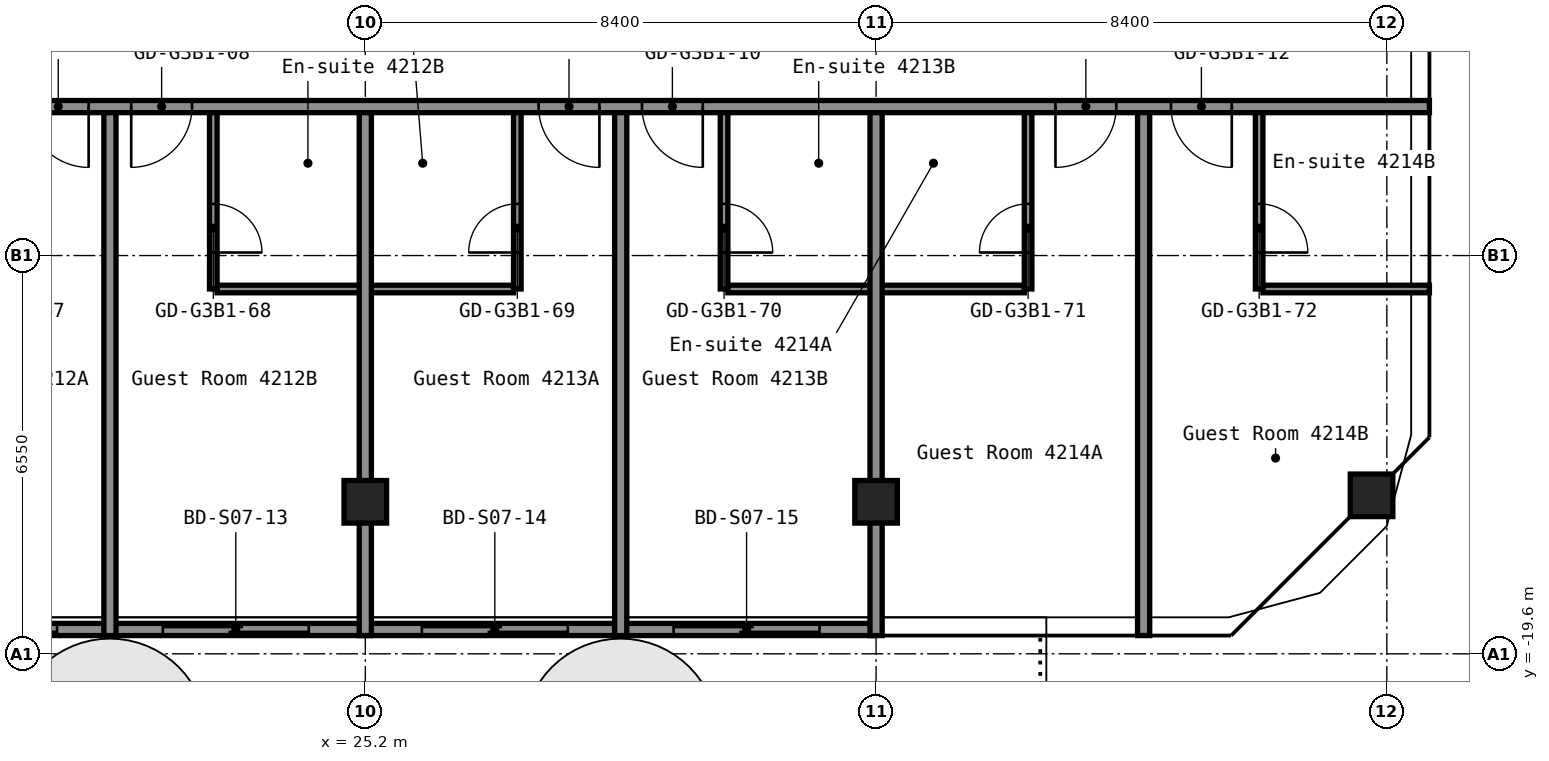
"""IFC4 building model, lengths in metres.
Left out: names, types, materials, properties, quantities, classifications, styles, units other than length and angle.
Written with IfcOpenShell. Run it as: python <this file> out.ifc"""

import sys

from ifc_helpers import new_model, si_unit, direction, frame, frame_2d, origin, origin_2d, place, context, subcontext, project, spatial, rectangle, hollow_rectangle, extrude, element, fill, save


model = new_model("IFC4")
c1 = context("Model", 3, precision=1e-05, world=origin(), true_north=direction((0.0, 1.0)))
c2 = subcontext(c1, "Body", "Model", "MODEL_VIEW")
j1 = project(units=[si_unit("LENGTHUNIT", "METRE"), si_unit("PLANEANGLEUNIT", "RADIAN")], contexts=[c1])
p1 = place(None, origin())
s1 = spatial("IfcSite", under=j1, at=p1, CompositionType="ELEMENT")
p2 = place(p1, origin())
s2 = spatial("IfcBuilding", under=s1, at=p2, CompositionType="ELEMENT")
p3 = place(p2, frame((0.0, 0.0, 150.2)))
s3 = spatial("IfcBuildingStorey", under=s2, at=p3, CompositionType="ELEMENT", Elevation=150.2)
for number, where, z_axis, x_axis in (
    (1, (25.2, -17.1, 0.0), (0.0, 0.0, 1.0), (1.0, 0.0, 0.0)),
    (2, (33.6, -17.1, 0.0), (0.0, 0.0, 1.0), (1.0, 0.0, 0.0)),
    (3, (41.749, -16.994, 0.0), (0.0, 0.0, 1.0), (1.0, 0.0, 0.0)),
):
    element("IfcColumn", number, at=place(p3, frame(where, z_axis=z_axis, x_axis=x_axis)), inside=s3, PredefinedType="COLUMN", context=c2, shape_type="SweptSolid", body=[
        extrude(hollow_rectangle(XDim=0.7, YDim=0.7, WallThickness=0.028, at=origin_2d()), origin(), (0.0, 0.0, 1.0), 2.75),
    ])
for number, where, z_axis, x_axis in (
    (4, (22.762, -13.6, 0.0), (0.0, 0.0, 1.0), (1.0, 0.0, 0.0)),
    (5, (31.163, -13.6, 0.0), (0.0, 0.0, 1.0), (1.0, 0.0, 0.0)),
):
    element("IfcWall", number, at=place(p3, frame(where, z_axis=z_axis, x_axis=x_axis)), inside=s3, PredefinedType="PARTITIONING", context=c2, shape_type="SweptSolid", body=[
        extrude(rectangle(XDim=4.875, YDim=0.125, at=frame_2d((2.438, 0.0))), origin(), (0.0, 0.0, 1.0), 2.75),
    ])
p4 = place(p3, frame((39.962, -13.6, 0.0), z_axis=(0.0, 0.0, 1.0), x_axis=(1.0, 0.0, 0.0)))
e6 = element("IfcWall", 6, at=p4, inside=s3, PredefinedType="PARTITIONING", context=c2, shape_type="SweptSolid", body=[
    extrude(rectangle(XDim=2.738, YDim=0.125, at=frame_2d((1.369, 0.0))), origin(), (0.0, 0.0, 1.0), 2.75),
])
p5 = place(p3, frame((16.8, -10.6, 0.0), z_axis=(0.0, 0.0, 1.0), x_axis=(1.0, 0.0, 0.0)))
e7 = element("IfcWall", 7, at=p5, inside=s3, PredefinedType="PARTITIONING", context=c2, shape_type="SweptSolid", body=[
    extrude(rectangle(XDim=25.9, YDim=0.2, at=frame_2d((12.95, 0.0))), origin(), (0.0, 0.0, 1.0), 2.75),
])
p6 = place(p5, frame((2.85, 0.0, 0.0)))
e8 = element("IfcOpeningElement", 8, at=p6, cuts=e7, PredefinedType="OPENING", context=c2, shape_type="SweptSolid", body=[
    extrude(rectangle(XDim=1.0, YDim=2.1, at=frame_2d((0.5, 1.05))), frame((0.0, 0.11, 0.0), z_axis=(0.0, -1.0, 0.0), x_axis=(1.0, 0.0, 0.0)), (0.0, 0.0, 1.0), 0.22),
])
p7 = place(p5, frame((4.55, 0.0, 0.0)))
e9 = element("IfcOpeningElement", 9, at=p7, cuts=e7, PredefinedType="OPENING", context=c2, shape_type="SweptSolid", body=[
    extrude(rectangle(XDim=1.0, YDim=2.1, at=frame_2d((0.5, 1.05))), frame((0.0, 0.11, 0.0), z_axis=(0.0, -1.0, 0.0), x_axis=(1.0, 0.0, 0.0)), (0.0, 0.0, 1.0), 0.22),
])
p8 = place(p5, frame((11.25, 0.0, 0.0)))
e10 = element("IfcOpeningElement", 10, at=p8, cuts=e7, PredefinedType="OPENING", context=c2, shape_type="SweptSolid", body=[
    extrude(rectangle(XDim=1.0, YDim=2.1, at=frame_2d((0.5, 1.05))), frame((0.0, 0.11, 0.0), z_axis=(0.0, -1.0, 0.0), x_axis=(1.0, 0.0, 0.0)), (0.0, 0.0, 1.0), 0.22),
])
p9 = place(p5, frame((12.95, 0.0, 0.0)))
e11 = element("IfcOpeningElement", 11, at=p9, cuts=e7, PredefinedType="OPENING", context=c2, shape_type="SweptSolid", body=[
    extrude(rectangle(XDim=1.0, YDim=2.1, at=frame_2d((0.5, 1.05))), frame((0.0, 0.11, 0.0), z_axis=(0.0, -1.0, 0.0), x_axis=(1.0, 0.0, 0.0)), (0.0, 0.0, 1.0), 0.22),
])
p10 = place(p5, frame((19.75, 0.0, 0.0)))
e12 = element("IfcOpeningElement", 12, at=p10, cuts=e7, PredefinedType="OPENING", context=c2, shape_type="SweptSolid", body=[
    extrude(rectangle(XDim=1.0, YDim=2.1, at=frame_2d((0.5, 1.05))), frame((0.0, 0.11, 0.0), z_axis=(0.0, -1.0, 0.0), x_axis=(1.0, 0.0, 0.0)), (0.0, 0.0, 1.0), 0.22),
])
p11 = place(p5, frame((21.65, 0.0, 0.0)))
e13 = element("IfcOpeningElement", 13, at=p11, cuts=e7, PredefinedType="OPENING", context=c2, shape_type="SweptSolid", body=[
    extrude(rectangle(XDim=1.0, YDim=2.1, at=frame_2d((0.5, 1.05))), frame((0.0, 0.11, 0.0), z_axis=(0.0, -1.0, 0.0), x_axis=(1.0, 0.0, 0.0)), (0.0, 0.0, 1.0), 0.22),
])
p12 = place(p3, frame((21.0, -19.3, 0.0), z_axis=(0.0, 0.0, 1.0), x_axis=(0.0, 1.0, 0.0)))
e14 = element("IfcWall", 14, at=p12, inside=s3, PredefinedType="PARTITIONING", context=c2, shape_type="SweptSolid", body=[
    extrude(rectangle(XDim=8.6, YDim=0.2, at=frame_2d((4.3, 0.0))), origin(), (0.0, 0.0, 1.0), 2.75),
])
p13 = place(p3, frame((22.7, -13.6, 0.0), z_axis=(0.0, 0.0, 1.0), x_axis=(0.0, 1.0, 0.0)))
e15 = element("IfcWall", 15, at=p13, inside=s3, PredefinedType="PARTITIONING", context=c2, shape_type="SweptSolid", body=[
    extrude(rectangle(XDim=2.9, YDim=0.125, at=frame_2d((1.45, 0.0))), origin(), (0.0, 0.0, 1.0), 2.75),
])
p14 = place(p13, frame((0.6, 0.0, 0.0)))
e16 = element("IfcOpeningElement", 16, at=p14, cuts=e15, PredefinedType="OPENING", context=c2, shape_type="SweptSolid", body=[
    extrude(rectangle(XDim=0.8, YDim=2.1, at=frame_2d((0.4, 1.05))), frame((0.0, 0.073, 0.0), z_axis=(0.0, -1.0, 0.0), x_axis=(1.0, 0.0, 0.0)), (0.0, 0.0, 1.0), 0.145),
])
p15 = place(p3, frame((25.2, -19.3, 0.0), z_axis=(0.0, 0.0, 1.0), x_axis=(0.0, 1.0, 0.0)))
e17 = element("IfcWall", 17, at=p15, inside=s3, PredefinedType="PARTITIONING", context=c2, shape_type="SweptSolid", body=[
    extrude(rectangle(XDim=8.6, YDim=0.2, at=frame_2d((4.3, 0.0))), origin(), (0.0, 0.0, 1.0), 2.75),
])
p16 = place(p3, frame((27.7, -13.6, 0.0), z_axis=(0.0, 0.0, 1.0), x_axis=(0.0, 1.0, 0.0)))
e18 = element("IfcWall", 18, at=p16, inside=s3, PredefinedType="PARTITIONING", context=c2, shape_type="SweptSolid", body=[
    extrude(rectangle(XDim=2.9, YDim=0.125, at=frame_2d((1.45, 0.0))), origin(), (0.0, 0.0, 1.0), 2.75),
])
p17 = place(p16, frame((0.6, 0.0, 0.0)))
e19 = element("IfcOpeningElement", 19, at=p17, cuts=e18, PredefinedType="OPENING", context=c2, shape_type="SweptSolid", body=[
    extrude(rectangle(XDim=0.8, YDim=2.1, at=frame_2d((0.4, 1.05))), frame((0.0, 0.073, 0.0), z_axis=(0.0, -1.0, 0.0), x_axis=(1.0, 0.0, 0.0)), (0.0, 0.0, 1.0), 0.145),
])
p18 = place(p3, frame((29.4, -19.3, 0.0), z_axis=(0.0, 0.0, 1.0), x_axis=(0.0, 1.0, 0.0)))
e20 = element("IfcWall", 20, at=p18, inside=s3, PredefinedType="PARTITIONING", context=c2, shape_type="SweptSolid", body=[
    extrude(rectangle(XDim=8.6, YDim=0.2, at=frame_2d((4.3, 0.0))), origin(), (0.0, 0.0, 1.0), 2.75),
])
p19 = place(p3, frame((31.1, -13.6, 0.0), z_axis=(0.0, 0.0, 1.0), x_axis=(0.0, 1.0, 0.0)))
e21 = element("IfcWall", 21, at=p19, inside=s3, PredefinedType="PARTITIONING", context=c2, shape_type="SweptSolid", body=[
    extrude(rectangle(XDim=2.9, YDim=0.125, at=frame_2d((1.45, 0.0))), origin(), (0.0, 0.0, 1.0), 2.75),
])
p20 = place(p19, frame((0.6, 0.0, 0.0)))
e22 = element("IfcOpeningElement", 22, at=p20, cuts=e21, PredefinedType="OPENING", context=c2, shape_type="SweptSolid", body=[
    extrude(rectangle(XDim=0.8, YDim=2.1, at=frame_2d((0.4, 1.05))), frame((0.0, 0.073, 0.0), z_axis=(0.0, -1.0, 0.0), x_axis=(1.0, 0.0, 0.0)), (0.0, 0.0, 1.0), 0.145),
])
p21 = place(p3, frame((33.6, -19.3, 0.0), z_axis=(0.0, 0.0, 1.0), x_axis=(0.0, 1.0, 0.0)))
e23 = element("IfcWall", 23, at=p21, inside=s3, PredefinedType="PARTITIONING", context=c2, shape_type="SweptSolid", body=[
    extrude(rectangle(XDim=8.6, YDim=0.2, at=frame_2d((4.3, 0.0))), origin(), (0.0, 0.0, 1.0), 2.75),
])
p22 = place(p3, frame((36.1, -13.6, 0.0), z_axis=(0.0, 0.0, 1.0), x_axis=(0.0, 1.0, 0.0)))
e24 = element("IfcWall", 24, at=p22, inside=s3, PredefinedType="PARTITIONING", context=c2, shape_type="SweptSolid", body=[
    extrude(rectangle(XDim=2.9, YDim=0.125, at=frame_2d((1.45, 0.0))), origin(), (0.0, 0.0, 1.0), 2.75),
])
p23 = place(p22, frame((0.6, 0.0, 0.0)))
e25 = element("IfcOpeningElement", 25, at=p23, cuts=e24, PredefinedType="OPENING", context=c2, shape_type="SweptSolid", body=[
    extrude(rectangle(XDim=0.8, YDim=2.1, at=frame_2d((0.4, 1.05))), frame((0.0, 0.073, 0.0), z_axis=(0.0, -1.0, 0.0), x_axis=(1.0, 0.0, 0.0)), (0.0, 0.0, 1.0), 0.145),
])
p24 = place(p3, frame((38.0, -19.3, 0.0), z_axis=(0.0, 0.0, 1.0), x_axis=(0.0, 1.0, 0.0)))
e26 = element("IfcWall", 26, at=p24, inside=s3, PredefinedType="PARTITIONING", context=c2, shape_type="SweptSolid", body=[
    extrude(rectangle(XDim=8.6, YDim=0.2, at=frame_2d((4.3, 0.0))), origin(), (0.0, 0.0, 1.0), 2.75),
])
p25 = place(p3, frame((39.9, -13.6, 0.0), z_axis=(0.0, 0.0, 1.0), x_axis=(0.0, 1.0, 0.0)))
e27 = element("IfcWall", 27, at=p25, inside=s3, PredefinedType="PARTITIONING", context=c2, shape_type="SweptSolid", body=[
    extrude(rectangle(XDim=2.9, YDim=0.125, at=frame_2d((1.45, 0.0))), origin(), (0.0, 0.0, 1.0), 2.75),
])
p26 = place(p25, frame((0.6, 0.0, 0.0)))
e28 = element("IfcOpeningElement", 28, at=p26, cuts=e27, PredefinedType="OPENING", context=c2, shape_type="SweptSolid", body=[
    extrude(rectangle(XDim=0.8, YDim=2.1, at=frame_2d((0.4, 1.05))), frame((0.0, 0.073, 0.0), z_axis=(0.0, -1.0, 0.0), x_axis=(1.0, 0.0, 0.0)), (0.0, 0.0, 1.0), 0.145),
])
p27 = place(p3, frame((16.82, -19.2, 0.0), z_axis=(0.0, 0.0, 1.0), x_axis=(1.0, 0.0, 0.0)))
p28 = place(p27, frame((0.91, 0.0, 0.0)))
p29 = place(p28, frame((2.4, 0.0, 0.0), z_axis=(0.0, 0.0, 1.0), x_axis=(-1.0, 0.0, 0.0)))
e29 = element("IfcDoor", 29, at=p29, inside=s3, OperationType="SLIDING_TO_LEFT", PredefinedType="DOOR", context=c2, shape_type="SweptSolid", body=[
    extrude(rectangle(XDim=2.4, YDim=2.2, at=frame_2d((1.2, 1.1))), frame((0.0, 0.025, 0.0), z_axis=(0.0, -1.0, 0.0), x_axis=(1.0, 0.0, 0.0)), (0.0, 0.0, 1.0), 0.05),
])
p30 = place(p3, frame((20.96, -19.2, 0.0), z_axis=(0.0, 0.0, 1.0), x_axis=(1.0, 0.0, 0.0)))
p31 = place(p30, frame((0.91, 0.0, 0.0)))
p32 = place(p31, frame((2.4, 0.0, 0.0), z_axis=(0.0, 0.0, 1.0), x_axis=(-1.0, 0.0, 0.0)))
e30 = element("IfcDoor", 30, at=p32, inside=s3, OperationType="SLIDING_TO_LEFT", PredefinedType="DOOR", context=c2, shape_type="SweptSolid", body=[
    extrude(rectangle(XDim=2.4, YDim=2.2, at=frame_2d((1.2, 1.1))), frame((0.0, 0.025, 0.0), z_axis=(0.0, -1.0, 0.0), x_axis=(1.0, 0.0, 0.0)), (0.0, 0.0, 1.0), 0.05),
])
p33 = place(p3, frame((25.22, -19.2, 0.0), z_axis=(0.0, 0.0, 1.0), x_axis=(1.0, 0.0, 0.0)))
p34 = place(p33, frame((0.91, 0.0, 0.0)))
p35 = place(p34, frame((2.4, 0.0, 0.0), z_axis=(0.0, 0.0, 1.0), x_axis=(-1.0, 0.0, 0.0)))
e31 = element("IfcDoor", 31, at=p35, inside=s3, OperationType="SLIDING_TO_LEFT", PredefinedType="DOOR", context=c2, shape_type="SweptSolid", body=[
    extrude(rectangle(XDim=2.4, YDim=2.2, at=frame_2d((1.2, 1.1))), frame((0.0, 0.025, 0.0), z_axis=(0.0, -1.0, 0.0), x_axis=(1.0, 0.0, 0.0)), (0.0, 0.0, 1.0), 0.05),
])
p36 = place(p3, frame((29.36, -19.2, 0.0), z_axis=(0.0, 0.0, 1.0), x_axis=(1.0, 0.0, 0.0)))
p37 = place(p36, frame((0.91, 0.0, 0.0)))
p38 = place(p37, frame((2.4, 0.0, 0.0), z_axis=(0.0, 0.0, 1.0), x_axis=(-1.0, 0.0, 0.0)))
e32 = element("IfcDoor", 32, at=p38, inside=s3, OperationType="SLIDING_TO_LEFT", PredefinedType="DOOR", context=c2, shape_type="SweptSolid", body=[
    extrude(rectangle(XDim=2.4, YDim=2.2, at=frame_2d((1.2, 1.1))), frame((0.0, 0.025, 0.0), z_axis=(0.0, -1.0, 0.0), x_axis=(1.0, 0.0, 0.0)), (0.0, 0.0, 1.0), 0.05),
])
p39 = place(p6, origin())
e33 = element("IfcDoor", 33, at=p39, inside=s3, OperationType="SINGLE_SWING_RIGHT", PredefinedType="DOOR", context=c2, shape_type="SweptSolid", body=[
    extrude(rectangle(XDim=1.0, YDim=2.1, at=frame_2d((0.5, 1.05))), frame((0.0, 0.025, 0.0), z_axis=(0.0, -1.0, 0.0), x_axis=(1.0, 0.0, 0.0)), (0.0, 0.0, 1.0), 0.05),
])
fill(e8, e33)
p40 = place(p7, origin())
e34 = element("IfcDoor", 34, at=p40, inside=s3, OperationType="SINGLE_SWING_LEFT", PredefinedType="DOOR", context=c2, shape_type="SweptSolid", body=[
    extrude(rectangle(XDim=1.0, YDim=2.1, at=frame_2d((0.5, 1.05))), frame((0.0, 0.025, 0.0), z_axis=(0.0, -1.0, 0.0), x_axis=(1.0, 0.0, 0.0)), (0.0, 0.0, 1.0), 0.05),
])
fill(e9, e34)
p41 = place(p8, origin())
e35 = element("IfcDoor", 35, at=p41, inside=s3, OperationType="SINGLE_SWING_RIGHT", PredefinedType="DOOR", context=c2, shape_type="SweptSolid", body=[
    extrude(rectangle(XDim=1.0, YDim=2.1, at=frame_2d((0.5, 1.05))), frame((0.0, 0.025, 0.0), z_axis=(0.0, -1.0, 0.0), x_axis=(1.0, 0.0, 0.0)), (0.0, 0.0, 1.0), 0.05),
])
fill(e10, e35)
p42 = place(p9, origin())
e36 = element("IfcDoor", 36, at=p42, inside=s3, OperationType="SINGLE_SWING_RIGHT", PredefinedType="DOOR", context=c2, shape_type="SweptSolid", body=[
    extrude(rectangle(XDim=1.0, YDim=2.1, at=frame_2d((0.5, 1.05))), frame((0.0, 0.025, 0.0), z_axis=(0.0, -1.0, 0.0), x_axis=(1.0, 0.0, 0.0)), (0.0, 0.0, 1.0), 0.05),
])
fill(e11, e36)
p43 = place(p10, origin())
e37 = element("IfcDoor", 37, at=p43, inside=s3, OperationType="SINGLE_SWING_LEFT", PredefinedType="DOOR", context=c2, shape_type="SweptSolid", body=[
    extrude(rectangle(XDim=1.0, YDim=2.1, at=frame_2d((0.5, 1.05))), frame((0.0, 0.025, 0.0), z_axis=(0.0, -1.0, 0.0), x_axis=(1.0, 0.0, 0.0)), (0.0, 0.0, 1.0), 0.05),
])
fill(e12, e37)
p44 = place(p11, origin())
e38 = element("IfcDoor", 38, at=p44, inside=s3, OperationType="SINGLE_SWING_RIGHT", PredefinedType="DOOR", context=c2, shape_type="SweptSolid", body=[
    extrude(rectangle(XDim=1.0, YDim=2.1, at=frame_2d((0.5, 1.05))), frame((0.0, 0.025, 0.0), z_axis=(0.0, -1.0, 0.0), x_axis=(1.0, 0.0, 0.0)), (0.0, 0.0, 1.0), 0.05),
])
fill(e13, e38)
p45 = place(p14, origin())
e39 = element("IfcDoor", 39, at=p45, inside=s3, OperationType="SINGLE_SWING_LEFT", PredefinedType="DOOR", context=c2, shape_type="SweptSolid", body=[
    extrude(rectangle(XDim=0.8, YDim=2.1, at=frame_2d((0.4, 1.05))), frame((0.0, 0.025, 0.0), z_axis=(0.0, -1.0, 0.0), x_axis=(1.0, 0.0, 0.0)), (0.0, 0.0, 1.0), 0.05),
])
fill(e16, e39)
p46 = place(p17, origin())
e40 = element("IfcDoor", 40, at=p46, inside=s3, OperationType="SINGLE_SWING_RIGHT", PredefinedType="DOOR", context=c2, shape_type="SweptSolid", body=[
    extrude(rectangle(XDim=0.8, YDim=2.1, at=frame_2d((0.4, 1.05))), frame((0.0, 0.025, 0.0), z_axis=(0.0, -1.0, 0.0), x_axis=(1.0, 0.0, 0.0)), (0.0, 0.0, 1.0), 0.05),
])
fill(e19, e40)
p47 = place(p20, origin())
e41 = element("IfcDoor", 41, at=p47, inside=s3, OperationType="SINGLE_SWING_LEFT", PredefinedType="DOOR", context=c2, shape_type="SweptSolid", body=[
    extrude(rectangle(XDim=0.8, YDim=2.1, at=frame_2d((0.4, 1.05))), frame((0.0, 0.025, 0.0), z_axis=(0.0, -1.0, 0.0), x_axis=(1.0, 0.0, 0.0)), (0.0, 0.0, 1.0), 0.05),
])
fill(e22, e41)
p48 = place(p23, origin())
e42 = element("IfcDoor", 42, at=p48, inside=s3, OperationType="SINGLE_SWING_RIGHT", PredefinedType="DOOR", context=c2, shape_type="SweptSolid", body=[
    extrude(rectangle(XDim=0.8, YDim=2.1, at=frame_2d((0.4, 1.05))), frame((0.0, 0.025, 0.0), z_axis=(0.0, -1.0, 0.0), x_axis=(1.0, 0.0, 0.0)), (0.0, 0.0, 1.0), 0.05),
])
fill(e25, e42)
p49 = place(p26, origin())
e43 = element("IfcDoor", 43, at=p49, inside=s3, OperationType="SINGLE_SWING_LEFT", PredefinedType="DOOR", context=c2, shape_type="SweptSolid", body=[
    extrude(rectangle(XDim=0.8, YDim=2.1, at=frame_2d((0.4, 1.05))), frame((0.0, 0.025, 0.0), z_axis=(0.0, -1.0, 0.0), x_axis=(1.0, 0.0, 0.0)), (0.0, 0.0, 1.0), 0.05),
])
fill(e28, e43)
save(model, sys.argv[1])
